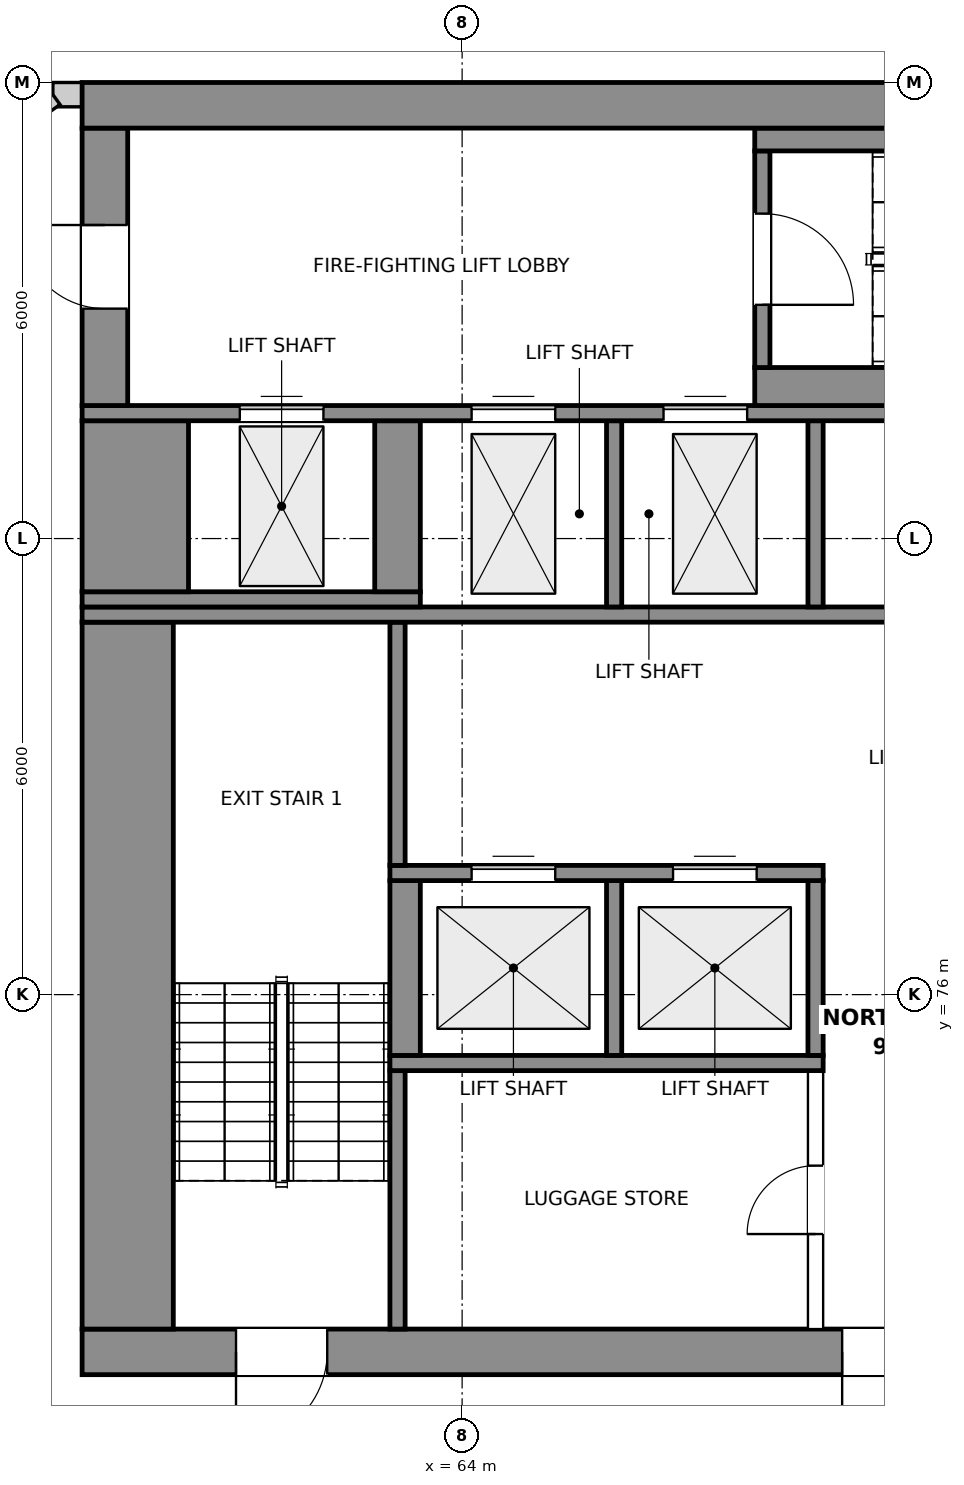
"""IFC4 building model, lengths in metres.
Left out: names, types, materials, properties, quantities, classifications, styles, units other than length and angle.
Written with IfcOpenShell. Run it as: python <this file> out.ifc"""

import sys

from ifc_helpers import new_model, si_unit, direction, frame, frame_2d, origin, place, context, subcontext, project, spatial, rectangle, extrude, element, fill, save


model = new_model("IFC4")
c1 = context("Model", 3, precision=1e-05, world=origin(), true_north=direction((0.0, 1.0)))
c2 = subcontext(c1, "Body", "Model", "MODEL_VIEW")
j1 = project(units=[si_unit("LENGTHUNIT", "METRE"), si_unit("PLANEANGLEUNIT", "RADIAN")], contexts=[c1])
p1 = place(None, origin())
s1 = spatial("IfcSite", under=j1, at=p1, CompositionType="ELEMENT")
p2 = place(p1, origin())
s2 = spatial("IfcBuilding", under=s1, at=p2, CompositionType="ELEMENT")
p3 = place(p2, frame((0.0, 0.0, 313.9)))
s3 = spatial("IfcBuildingStorey", under=s2, at=p3, CompositionType="ELEMENT", Elevation=313.9)
p4 = place(p3, frame((59.0, 87.84, 0.0), z_axis=(0.0, 0.0, 1.0), x_axis=(-1.0, 0.0, 0.0)))
e1 = element("IfcWall", 1, at=p4, inside=s3, PredefinedType="SOLIDWALL", context=c2, shape_type="SweptSolid", body=[
    extrude(rectangle(XDim=0.385, YDim=0.32, at=frame_2d((0.192, 0.0))), origin(), (0.0, 0.0, 1.0), 3.6),
])
p5 = place(p3, frame((58.615, 87.84, 0.0), z_axis=(0.0, 0.0, 1.0), x_axis=(-0.809010691028, -0.587793928007, 0.0)))
e2 = element("IfcWall", 2, at=p5, inside=s3, PredefinedType="SOLIDWALL", context=c2, shape_type="SweptSolid", body=[
    extrude(rectangle(XDim=6.572, YDim=0.32, at=frame_2d((3.286, 0.0))), origin(), (0.0, 0.0, 1.0), 3.6),
])
p6 = place(p5, frame((2.46, 0.0, 0.75)))
e3 = element("IfcOpeningElement", 3, at=p6, cuts=e2, PredefinedType="OPENING", context=c2, shape_type="SweptSolid", body=[
    extrude(rectangle(XDim=2.1, YDim=2.1, at=frame_2d((1.05, 1.05))), frame((0.0, 0.17, 0.0), z_axis=(0.0, -1.0, 0.0), x_axis=(1.0, 0.0, 0.0)), (0.0, 0.0, 1.0), 0.34),
])
p7 = place(p3, frame((59.0, 71.3, 0.0), z_axis=(0.0, 0.0, 1.0), x_axis=(1.0, 0.0, 0.0)))
e4 = element("IfcWall", 4, at=p7, inside=s3, PredefinedType="SHEAR", context=c2, shape_type="SweptSolid", body=[
    extrude(rectangle(XDim=22.0, YDim=0.6, at=frame_2d((11.0, 0.0))), origin(), (0.0, 0.0, 1.0), 3.9),
])
p8 = place(p7, frame((2.025, 0.0, 0.0)))
e5 = element("IfcOpeningElement", 5, at=p8, cuts=e4, PredefinedType="OPENING", context=c2, shape_type="SweptSolid", body=[
    extrude(rectangle(XDim=1.2, YDim=2.1, at=frame_2d((0.6, 1.05))), frame((0.0, 0.31, 0.0), z_axis=(0.0, -1.0, 0.0), x_axis=(1.0, 0.0, 0.0)), (0.0, 0.0, 1.0), 0.62),
])
p9 = place(p7, frame((18.775, 0.0, 0.0)))
e6 = element("IfcOpeningElement", 6, at=p9, cuts=e4, PredefinedType="OPENING", context=c2, shape_type="SweptSolid", body=[
    extrude(rectangle(XDim=1.2, YDim=2.1, at=frame_2d((0.6, 1.05))), frame((0.0, 0.31, 0.0), z_axis=(0.0, -1.0, 0.0), x_axis=(1.0, 0.0, 0.0)), (0.0, 0.0, 1.0), 0.62),
])
p10 = place(p7, frame((10.0, 0.0, 0.0)))
e7 = element("IfcOpeningElement", 7, at=p10, cuts=e4, PredefinedType="OPENING", context=c2, shape_type="SweptSolid", body=[
    extrude(rectangle(XDim=2.0, YDim=2.1, at=frame_2d((1.0, 1.05))), frame((0.0, 0.31, 0.0), z_axis=(0.0, -1.0, 0.0), x_axis=(1.0, 0.0, 0.0)), (0.0, 0.0, 1.0), 0.62),
])
p11 = place(p3, frame((59.6, 71.6, 0.0), z_axis=(0.0, 0.0, 1.0), x_axis=(0.0, 1.0, 0.0)))
e8 = element("IfcWall", 8, at=p11, inside=s3, PredefinedType="SHEAR", context=c2, shape_type="SweptSolid", body=[
    extrude(rectangle(XDim=9.3, YDim=1.2, at=frame_2d((4.65, 0.0))), origin(), (0.0, 0.0, 1.0), 3.9),
])
p12 = place(p3, frame((63.15, 71.6, 0.0), z_axis=(0.0, 0.0, 1.0), x_axis=(0.0, 1.0, 0.0)))
e9 = element("IfcWall", 9, at=p12, inside=s3, PredefinedType="SHEAR", context=c2, shape_type="SweptSolid", body=[
    extrude(rectangle(XDim=3.4, YDim=0.2, at=frame_2d((1.7, 0.0))), origin(), (0.0, 0.0, 1.0), 3.9),
])
p13 = place(p3, frame((68.65, 71.6, 0.0), z_axis=(0.0, 0.0, 1.0), x_axis=(0.0, 1.0, 0.0)))
e10 = element("IfcWall", 10, at=p13, inside=s3, PredefinedType="PARTITIONING", context=c2, shape_type="SweptSolid", body=[
    extrude(rectangle(XDim=3.4, YDim=0.2, at=frame_2d((1.7, 0.0))), origin(), (0.0, 0.0, 1.0), 3.6),
])
p14 = place(p13, frame((1.25, 0.0, 0.0)))
e11 = element("IfcOpeningElement", 11, at=p14, cuts=e10, PredefinedType="OPENING", context=c2, shape_type="SweptSolid", body=[
    extrude(rectangle(XDim=0.9, YDim=2.1, at=frame_2d((0.45, 1.05))), frame((0.0, 0.11, 0.0), z_axis=(0.0, -1.0, 0.0), x_axis=(1.0, 0.0, 0.0)), (0.0, 0.0, 1.0), 0.22),
])
p15 = place(p3, frame((63.05, 75.1, 0.0), z_axis=(0.0, 0.0, 1.0), x_axis=(1.0, 0.0, 0.0)))
e12 = element("IfcWall", 12, at=p15, inside=s3, PredefinedType="SHEAR", context=c2, shape_type="SweptSolid", body=[
    extrude(rectangle(XDim=5.7, YDim=0.2, at=frame_2d((2.85, 0.0))), origin(), (0.0, 0.0, 1.0), 3.9),
])
p16 = place(p3, frame((63.25, 75.2, 0.0), z_axis=(0.0, 0.0, 1.0), x_axis=(0.0, 1.0, 0.0)))
e13 = element("IfcWall", 13, at=p16, inside=s3, PredefinedType="SHEAR", context=c2, shape_type="SweptSolid", body=[
    extrude(rectangle(XDim=2.3, YDim=0.4, at=frame_2d((1.15, 0.0))), origin(), (0.0, 0.0, 1.0), 3.9),
])
for number, where, z_axis, x_axis in (
    (14, (66.0, 75.2, 0.0), (0.0, 0.0, 1.0), (0.0, 1.0, 0.0)),
    (15, (68.65, 75.2, 0.0), (0.0, 0.0, 1.0), (0.0, 1.0, 0.0)),
):
    element("IfcWall", number, at=place(p3, frame(where, z_axis=z_axis, x_axis=x_axis)), inside=s3, PredefinedType="SHEAR", context=c2, shape_type="SweptSolid", body=[
        extrude(rectangle(XDim=2.3, YDim=0.2, at=frame_2d((1.15, 0.0))), origin(), (0.0, 0.0, 1.0), 3.9),
    ])
p17 = place(p3, frame((63.05, 77.6, 0.0), z_axis=(0.0, 0.0, 1.0), x_axis=(1.0, 0.0, 0.0)))
e16 = element("IfcWall", 16, at=p17, inside=s3, PredefinedType="SHEAR", context=c2, shape_type="SweptSolid", body=[
    extrude(rectangle(XDim=5.7, YDim=0.2, at=frame_2d((2.85, 0.0))), origin(), (0.0, 0.0, 1.0), 3.9),
])
p18 = place(p17, frame((1.075, 0.0, 0.0)))
e17 = element("IfcOpeningElement", 17, at=p18, cuts=e16, PredefinedType="OPENING", context=c2, shape_type="SweptSolid", body=[
    extrude(rectangle(XDim=1.1, YDim=2.1, at=frame_2d((0.55, 1.05))), frame((0.0, 0.11, 0.0), z_axis=(0.0, -1.0, 0.0), x_axis=(1.0, 0.0, 0.0)), (0.0, 0.0, 1.0), 0.22),
])
p19 = place(p17, frame((3.725, 0.0, 0.0)))
e18 = element("IfcOpeningElement", 18, at=p19, cuts=e16, PredefinedType="OPENING", context=c2, shape_type="SweptSolid", body=[
    extrude(rectangle(XDim=1.1, YDim=2.1, at=frame_2d((0.55, 1.05))), frame((0.0, 0.11, 0.0), z_axis=(0.0, -1.0, 0.0), x_axis=(1.0, 0.0, 0.0)), (0.0, 0.0, 1.0), 0.22),
])
p20 = place(p3, frame((63.15, 77.7, 0.0), z_axis=(0.0, 0.0, 1.0), x_axis=(0.0, 1.0, 0.0)))
e19 = element("IfcWall", 19, at=p20, inside=s3, PredefinedType="SHEAR", context=c2, shape_type="SweptSolid", body=[
    extrude(rectangle(XDim=3.2, YDim=0.2, at=frame_2d((1.6, 0.0))), origin(), (0.0, 0.0, 1.0), 3.9),
])
p21 = place(p3, frame((59.0, 81.0, 0.0), z_axis=(0.0, 0.0, 1.0), x_axis=(1.0, 0.0, 0.0)))
e20 = element("IfcWall", 20, at=p21, inside=s3, PredefinedType="SHEAR", context=c2, shape_type="SweptSolid", body=[
    extrude(rectangle(XDim=22.0, YDim=0.2, at=frame_2d((11.0, 0.0))), origin(), (0.0, 0.0, 1.0), 3.9),
])
p22 = place(p21, frame((11.85, 0.0, 0.0)))
e21 = element("IfcOpeningElement", 21, at=p22, cuts=e20, PredefinedType="OPENING", context=c2, shape_type="SweptSolid", body=[
    extrude(rectangle(XDim=0.9, YDim=2.1, at=frame_2d((0.45, 1.05))), frame((0.0, 0.11, 0.0), z_axis=(0.0, -1.0, 0.0), x_axis=(1.0, 0.0, 0.0)), (0.0, 0.0, 1.0), 0.22),
])
p23 = place(p3, frame((59.0, 81.2, 0.0), z_axis=(0.0, 0.0, 1.0), x_axis=(1.0, 0.0, 0.0)))
e22 = element("IfcWall", 22, at=p23, inside=s3, PredefinedType="SHEAR", context=c2, shape_type="SweptSolid", body=[
    extrude(rectangle(XDim=4.45, YDim=0.2, at=frame_2d((2.225, 0.0))), origin(), (0.0, 0.0, 1.0), 3.9),
])
for number, where, z_axis, x_axis in (
    (23, (66.0, 81.1, 0.0), (0.0, 0.0, 1.0), (0.0, 1.0, 0.0)),
    (24, (68.65, 81.1, 0.0), (0.0, 0.0, 1.0), (0.0, 1.0, 0.0)),
):
    element("IfcWall", number, at=place(p3, frame(where, z_axis=z_axis, x_axis=x_axis)), inside=s3, PredefinedType="SHEAR", context=c2, shape_type="SweptSolid", body=[
        extrude(rectangle(XDim=2.45, YDim=0.2, at=frame_2d((1.225, 0.0))), origin(), (0.0, 0.0, 1.0), 3.9),
    ])
p24 = place(p3, frame((59.7, 81.3, 0.0), z_axis=(0.0, 0.0, 1.0), x_axis=(0.0, 1.0, 0.0)))
e25 = element("IfcWall", 25, at=p24, inside=s3, PredefinedType="SHEAR", context=c2, shape_type="SweptSolid", body=[
    extrude(rectangle(XDim=2.25, YDim=1.4, at=frame_2d((1.125, 0.0))), origin(), (0.0, 0.0, 1.0), 3.9),
])
p25 = place(p3, frame((63.15, 81.3, 0.0), z_axis=(0.0, 0.0, 1.0), x_axis=(0.0, 1.0, 0.0)))
e26 = element("IfcWall", 26, at=p25, inside=s3, PredefinedType="SHEAR", context=c2, shape_type="SweptSolid", body=[
    extrude(rectangle(XDim=2.25, YDim=0.6, at=frame_2d((1.125, 0.0))), origin(), (0.0, 0.0, 1.0), 3.9),
])
p26 = place(p3, frame((59.0, 83.65, 0.0), z_axis=(0.0, 0.0, 1.0), x_axis=(1.0, 0.0, 0.0)))
e27 = element("IfcWall", 27, at=p26, inside=s3, PredefinedType="SHEAR", context=c2, shape_type="SweptSolid", body=[
    extrude(rectangle(XDim=22.0, YDim=0.2, at=frame_2d((11.0, 0.0))), origin(), (0.0, 0.0, 1.0), 3.9),
])
p27 = place(p26, frame((5.125, 0.0, 0.0)))
e28 = element("IfcOpeningElement", 28, at=p27, cuts=e27, PredefinedType="OPENING", context=c2, shape_type="SweptSolid", body=[
    extrude(rectangle(XDim=1.1, YDim=2.1, at=frame_2d((0.55, 1.05))), frame((0.0, 0.11, 0.0), z_axis=(0.0, -1.0, 0.0), x_axis=(1.0, 0.0, 0.0)), (0.0, 0.0, 1.0), 0.22),
])
p28 = place(p26, frame((7.65, 0.0, 0.0)))
e29 = element("IfcOpeningElement", 29, at=p28, cuts=e27, PredefinedType="OPENING", context=c2, shape_type="SweptSolid", body=[
    extrude(rectangle(XDim=1.1, YDim=2.1, at=frame_2d((0.55, 1.05))), frame((0.0, 0.11, 0.0), z_axis=(0.0, -1.0, 0.0), x_axis=(1.0, 0.0, 0.0)), (0.0, 0.0, 1.0), 0.22),
])
p29 = place(p26, frame((18.775, 0.0, 0.0)))
e30 = element("IfcOpeningElement", 30, at=p29, cuts=e27, PredefinedType="OPENING", context=c2, shape_type="SweptSolid", body=[
    extrude(rectangle(XDim=1.2, YDim=2.1, at=frame_2d((0.6, 1.05))), frame((0.0, 0.11, 0.0), z_axis=(0.0, -1.0, 0.0), x_axis=(1.0, 0.0, 0.0)), (0.0, 0.0, 1.0), 0.22),
])
p30 = place(p26, frame((2.075, 0.0, 0.0)))
e31 = element("IfcOpeningElement", 31, at=p30, cuts=e27, PredefinedType="OPENING", context=c2, shape_type="SweptSolid", body=[
    extrude(rectangle(XDim=1.1, YDim=2.1, at=frame_2d((0.55, 1.05))), frame((0.0, 0.11, 0.0), z_axis=(0.0, -1.0, 0.0), x_axis=(1.0, 0.0, 0.0)), (0.0, 0.0, 1.0), 0.22),
])
p31 = place(p3, frame((59.3, 83.75, 0.0), z_axis=(0.0, 0.0, 1.0), x_axis=(0.0, 1.0, 0.0)))
e32 = element("IfcWall", 32, at=p31, inside=s3, PredefinedType="SHEAR", context=c2, shape_type="SweptSolid", body=[
    extrude(rectangle(XDim=3.65, YDim=0.6, at=frame_2d((1.825, 0.0))), origin(), (0.0, 0.0, 1.0), 3.9),
])
p32 = place(p31, frame((1.275, 0.0, 0.0)))
e33 = element("IfcOpeningElement", 33, at=p32, cuts=e32, PredefinedType="OPENING", context=c2, shape_type="SweptSolid", body=[
    extrude(rectangle(XDim=1.1, YDim=2.1, at=frame_2d((0.55, 1.05))), frame((0.0, 0.31, 0.0), z_axis=(0.0, -1.0, 0.0), x_axis=(1.0, 0.0, 0.0)), (0.0, 0.0, 1.0), 0.62),
])
p33 = place(p3, frame((67.85, 84.0, 0.0), z_axis=(0.0, 0.0, 1.0), x_axis=(1.0, 0.0, 0.0)))
e34 = element("IfcWall", 34, at=p33, inside=s3, PredefinedType="SHEAR", context=c2, shape_type="SweptSolid", body=[
    extrude(rectangle(XDim=9.1, YDim=0.5, at=frame_2d((4.55, 0.0))), origin(), (0.0, 0.0, 1.0), 3.9),
])
p34 = place(p3, frame((67.95, 84.25, 0.0), z_axis=(0.0, 0.0, 1.0), x_axis=(0.0, 1.0, 0.0)))
e35 = element("IfcWall", 35, at=p34, inside=s3, PredefinedType="SHEAR", context=c2, shape_type="SweptSolid", body=[
    extrude(rectangle(XDim=2.85, YDim=0.2, at=frame_2d((1.425, 0.0))), origin(), (0.0, 0.0, 1.0), 3.9),
])
p35 = place(p34, frame((0.825, 0.0, 0.0)))
e36 = element("IfcOpeningElement", 36, at=p35, cuts=e35, PredefinedType="OPENING", context=c2, shape_type="SweptSolid", body=[
    extrude(rectangle(XDim=1.2, YDim=2.1, at=frame_2d((0.6, 1.05))), frame((0.0, 0.11, 0.0), z_axis=(0.0, -1.0, 0.0), x_axis=(1.0, 0.0, 0.0)), (0.0, 0.0, 1.0), 0.22),
])
p36 = place(p3, frame((67.85, 87.25, 0.0), z_axis=(0.0, 0.0, 1.0), x_axis=(1.0, 0.0, 0.0)))
e37 = element("IfcWall", 37, at=p36, inside=s3, PredefinedType="SHEAR", context=c2, shape_type="SweptSolid", body=[
    extrude(rectangle(XDim=9.1, YDim=0.3, at=frame_2d((4.55, 0.0))), origin(), (0.0, 0.0, 1.0), 3.9),
])
p37 = place(p3, frame((59.0, 87.7, 0.0), z_axis=(0.0, 0.0, 1.0), x_axis=(1.0, 0.0, 0.0)))
e38 = element("IfcWall", 38, at=p37, inside=s3, PredefinedType="SHEAR", context=c2, shape_type="SweptSolid", body=[
    extrude(rectangle(XDim=22.0, YDim=0.6, at=frame_2d((11.0, 0.0))), origin(), (0.0, 0.0, 1.0), 3.9),
])
p38 = place(p8, frame((1.2, 0.0, 0.0), z_axis=(0.0, 0.0, 1.0), x_axis=(-1.0, 0.0, 0.0)))
e39 = element("IfcDoor", 39, at=p38, inside=s3, OperationType="SINGLE_SWING_RIGHT", PredefinedType="DOOR", context=c2, shape_type="SweptSolid", body=[
    extrude(rectangle(XDim=1.2, YDim=2.1, at=frame_2d((0.6, 1.05))), frame((0.0, 0.025, 0.0), z_axis=(0.0, -1.0, 0.0), x_axis=(1.0, 0.0, 0.0)), (0.0, 0.0, 1.0), 0.05),
])
fill(e5, e39)
p39 = place(p35, frame((1.2, 0.0, 0.0), z_axis=(0.0, 0.0, 1.0), x_axis=(-1.0, 0.0, 0.0)))
e40 = element("IfcDoor", 40, at=p39, inside=s3, OperationType="SINGLE_SWING_RIGHT", PredefinedType="DOOR", context=c2, shape_type="SweptSolid", body=[
    extrude(rectangle(XDim=1.2, YDim=2.1, at=frame_2d((0.6, 1.05))), frame((0.0, 0.025, 0.0), z_axis=(0.0, -1.0, 0.0), x_axis=(1.0, 0.0, 0.0)), (0.0, 0.0, 1.0), 0.05),
])
fill(e36, e40)
p40 = place(p10, frame((2.0, 0.0, 0.0), z_axis=(0.0, 0.0, 1.0), x_axis=(-1.0, 0.0, 0.0)))
e41 = element("IfcDoor", 41, at=p40, inside=s3, OperationType="DOUBLE_DOOR_SINGLE_SWING", PredefinedType="DOOR", context=c2, shape_type="SweptSolid", body=[
    extrude(rectangle(XDim=2.0, YDim=2.1, at=frame_2d((1.0, 1.05))), frame((0.0, 0.025, 0.0), z_axis=(0.0, -1.0, 0.0), x_axis=(1.0, 0.0, 0.0)), (0.0, 0.0, 1.0), 0.05),
])
fill(e7, e41)
p41 = place(p14, origin())
e42 = element("IfcDoor", 42, at=p41, inside=s3, OperationType="SINGLE_SWING_LEFT", PredefinedType="DOOR", context=c2, shape_type="SweptSolid", body=[
    extrude(rectangle(XDim=0.9, YDim=2.1, at=frame_2d((0.45, 1.05))), frame((0.0, 0.025, 0.0), z_axis=(0.0, -1.0, 0.0), x_axis=(1.0, 0.0, 0.0)), (0.0, 0.0, 1.0), 0.05),
])
fill(e11, e42)
p42 = place(p32, origin())
e43 = element("IfcDoor", 43, at=p42, inside=s3, OperationType="SINGLE_SWING_RIGHT", PredefinedType="DOOR", context=c2, shape_type="SweptSolid", body=[
    extrude(rectangle(XDim=1.1, YDim=2.1, at=frame_2d((0.55, 1.05))), frame((0.0, 0.025, 0.0), z_axis=(0.0, -1.0, 0.0), x_axis=(1.0, 0.0, 0.0)), (0.0, 0.0, 1.0), 0.05),
])
fill(e33, e43)
p43 = place(p18, origin())
e44 = element("IfcDoor", 44, at=p43, inside=s3, OperationType="DOUBLE_DOOR_SLIDING", PredefinedType="DOOR", context=c2, shape_type="SweptSolid", body=[
    extrude(rectangle(XDim=1.1, YDim=2.1, at=frame_2d((0.55, 1.05))), frame((0.0, 0.025, 0.0), z_axis=(0.0, -1.0, 0.0), x_axis=(1.0, 0.0, 0.0)), (0.0, 0.0, 1.0), 0.05),
])
fill(e17, e44)
p44 = place(p19, origin())
e45 = element("IfcDoor", 45, at=p44, inside=s3, OperationType="DOUBLE_DOOR_SLIDING", PredefinedType="DOOR", context=c2, shape_type="SweptSolid", body=[
    extrude(rectangle(XDim=1.1, YDim=2.1, at=frame_2d((0.55, 1.05))), frame((0.0, 0.025, 0.0), z_axis=(0.0, -1.0, 0.0), x_axis=(1.0, 0.0, 0.0)), (0.0, 0.0, 1.0), 0.05),
])
fill(e18, e45)
p45 = place(p27, origin())
e46 = element("IfcDoor", 46, at=p45, inside=s3, OperationType="DOUBLE_DOOR_SLIDING", PredefinedType="DOOR", context=c2, shape_type="SweptSolid", body=[
    extrude(rectangle(XDim=1.1, YDim=2.1, at=frame_2d((0.55, 1.05))), frame((0.0, 0.025, 0.0), z_axis=(0.0, -1.0, 0.0), x_axis=(1.0, 0.0, 0.0)), (0.0, 0.0, 1.0), 0.05),
])
fill(e28, e46)
p46 = place(p28, origin())
e47 = element("IfcDoor", 47, at=p46, inside=s3, OperationType="DOUBLE_DOOR_SLIDING", PredefinedType="DOOR", context=c2, shape_type="SweptSolid", body=[
    extrude(rectangle(XDim=1.1, YDim=2.1, at=frame_2d((0.55, 1.05))), frame((0.0, 0.025, 0.0), z_axis=(0.0, -1.0, 0.0), x_axis=(1.0, 0.0, 0.0)), (0.0, 0.0, 1.0), 0.05),
])
fill(e29, e47)
p47 = place(p30, origin())
e48 = element("IfcDoor", 48, at=p47, inside=s3, OperationType="DOUBLE_DOOR_SLIDING", PredefinedType="DOOR", context=c2, shape_type="SweptSolid", body=[
    extrude(rectangle(XDim=1.1, YDim=2.1, at=frame_2d((0.55, 1.05))), frame((0.0, 0.025, 0.0), z_axis=(0.0, -1.0, 0.0), x_axis=(1.0, 0.0, 0.0)), (0.0, 0.0, 1.0), 0.05),
])
fill(e31, e48)
save(model, sys.argv[1])
